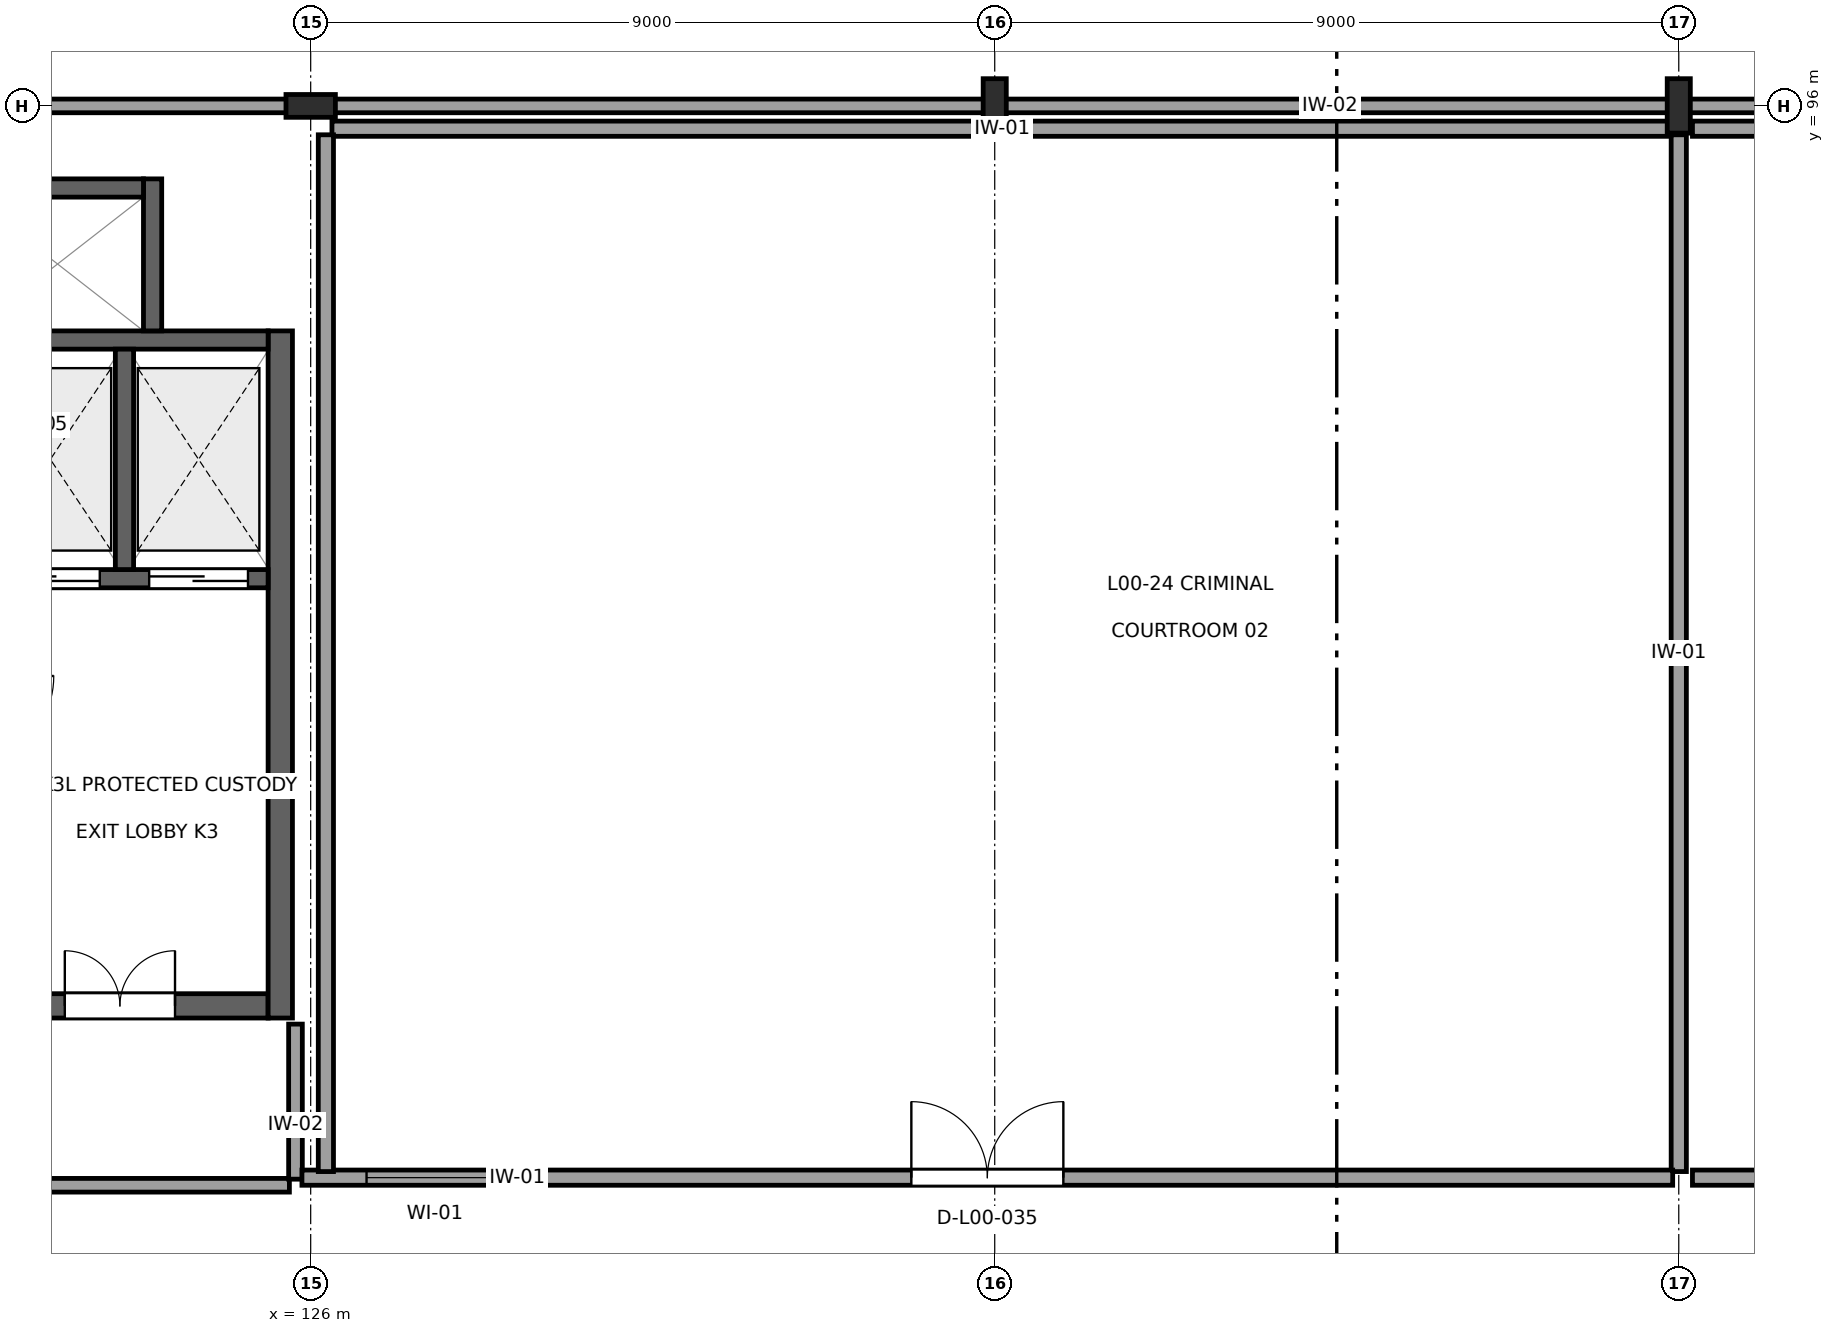
"""IFC4 building model, lengths in metres.
Left out: names, types, materials, properties, quantities, classifications, styles, units other than length and angle.
Written with IfcOpenShell. Run it as: python <this file> out.ifc"""

import sys

from ifc_helpers import new_model, si_unit, direction, frame, frame_2d, origin, origin_2d, place, context, subcontext, project, spatial, rectangle, i_section, extrude, element, fill, save


model = new_model("IFC4")
c1 = context("Model", 3, precision=1e-05, world=origin(), true_north=direction((0.0, 1.0)))
c2 = subcontext(c1, "Body", "Model", "MODEL_VIEW")
j1 = project(units=[si_unit("LENGTHUNIT", "METRE"), si_unit("PLANEANGLEUNIT", "RADIAN")], contexts=[c1])
p1 = place(None, origin())
s1 = spatial("IfcSite", under=j1, at=p1, CompositionType="ELEMENT")
p2 = place(p1, origin())
s2 = spatial("IfcBuilding", under=s1, at=p2, CompositionType="ELEMENT")
p3 = place(p2, origin())
s3 = spatial("IfcBuildingStorey", under=s2, at=p3, CompositionType="ELEMENT", Elevation=0.0)
p4 = place(p3, frame((126.0, 96.0, 0.0), z_axis=(0.0, 0.0, 1.0), x_axis=(0.0, 1.0, 0.0)))
e1 = element("IfcColumn", 1, at=p4, inside=s3, PredefinedType="COLUMN", context=c2, shape_type="SweptSolid", body=[
    extrude(i_section(OverallWidth=0.3, OverallDepth=0.65, WebThickness=0.016, FlangeThickness=0.031, at=origin_2d()), origin(), (0.0, 0.0, 1.0), 5.4),
])
for number, where, z_axis, x_axis in (
    (2, (135.0, 96.0, 0.0), (0.0, 0.0, 1.0), (1.0, 0.0, 0.0)),
    (3, (144.0, 96.0, 0.0), (0.0, 0.0, 1.0), (1.0, 0.0, 0.0)),
):
    element("IfcColumn", number, at=place(p3, frame(where, z_axis=z_axis, x_axis=x_axis)), inside=s3, PredefinedType="COLUMN", context=c2, shape_type="SweptSolid", body=[
        extrude(i_section(OverallWidth=0.304, OverallDepth=0.716, WebThickness=0.021, FlangeThickness=0.04, at=origin_2d()), origin(), (0.0, 0.0, 1.0), 5.4),
    ])
p5 = place(p3, frame((121.54, 84.16, 0.0), z_axis=(0.0, 0.0, 1.0), x_axis=(1.0, 0.0, 0.0)))
e4 = element("IfcWall", 4, at=p5, inside=s3, PredefinedType="SHEAR", context=c2, shape_type="SweptSolid", body=[
    extrude(rectangle(XDim=3.9, YDim=0.32, at=frame_2d((1.95, 0.0))), origin(), (0.0, 0.0, 1.0), 5.06),
])
p6 = place(p5, frame((1.225, 0.0, 0.0)))
e5 = element("IfcOpeningElement", 5, at=p6, cuts=e4, PredefinedType="OPENING", context=c2, shape_type="SweptSolid", body=[
    extrude(rectangle(XDim=1.45, YDim=2.2, at=frame_2d((0.725, 1.1))), frame((0.0, 0.175, 0.0), z_axis=(0.0, -1.0, 0.0), x_axis=(1.0, 0.0, 0.0)), (0.0, 0.0, 1.0), 0.35),
])
p7 = place(p3, frame((125.6, 84.0, 0.0), z_axis=(0.0, 0.0, 1.0), x_axis=(0.0, 1.0, 0.0)))
e6 = element("IfcWall", 6, at=p7, inside=s3, PredefinedType="SHEAR", context=c2, shape_type="SweptSolid", body=[
    extrude(rectangle(XDim=9.04, YDim=0.32, at=frame_2d((4.52, 0.0))), origin(), (0.0, 0.0, 1.0), 5.06),
])
p8 = place(p3, frame((121.54, 89.78, 0.0), z_axis=(0.0, 0.0, 1.0), x_axis=(1.0, 0.0, 0.0)))
e7 = element("IfcWall", 7, at=p8, inside=s3, PredefinedType="SHEAR", context=c2, shape_type="SweptSolid", body=[
    extrude(rectangle(XDim=3.9, YDim=0.24, at=frame_2d((1.95, 0.0))), origin(), (0.0, 0.0, 1.0), 5.21),
])
p9 = place(p8, frame((0.385, 0.0, 0.0)))
e8 = element("IfcOpeningElement", 8, at=p9, cuts=e7, PredefinedType="OPENING", context=c2, shape_type="SweptSolid", body=[
    extrude(rectangle(XDim=1.3, YDim=2.2, at=frame_2d((0.65, 1.1))), frame((0.0, 0.135, 0.0), z_axis=(0.0, -1.0, 0.0), x_axis=(1.0, 0.0, 0.0)), (0.0, 0.0, 1.0), 0.27),
])
p10 = place(p8, frame((2.335, 0.0, 0.0)))
e9 = element("IfcOpeningElement", 9, at=p10, cuts=e7, PredefinedType="OPENING", context=c2, shape_type="SweptSolid", body=[
    extrude(rectangle(XDim=1.3, YDim=2.2, at=frame_2d((0.65, 1.1))), frame((0.0, 0.135, 0.0), z_axis=(0.0, -1.0, 0.0), x_axis=(1.0, 0.0, 0.0)), (0.0, 0.0, 1.0), 0.27),
])
p11 = place(p3, frame((121.54, 92.92, 0.0), z_axis=(0.0, 0.0, 1.0), x_axis=(1.0, 0.0, 0.0)))
e10 = element("IfcWall", 10, at=p11, inside=s3, PredefinedType="SHEAR", context=c2, shape_type="SweptSolid", body=[
    extrude(rectangle(XDim=3.9, YDim=0.24, at=frame_2d((1.95, 0.0))), origin(), (0.0, 0.0, 1.0), 5.21),
])
p12 = place(p3, frame((123.55, 89.9, 0.0), z_axis=(0.0, 0.0, 1.0), x_axis=(0.0, 1.0, 0.0)))
e11 = element("IfcWall", 11, at=p12, inside=s3, PredefinedType="SHEAR", context=c2, shape_type="SweptSolid", body=[
    extrude(rectangle(XDim=2.9, YDim=0.24, at=frame_2d((1.45, 0.0))), origin(), (0.0, 0.0, 1.0), 5.21),
])
p13 = place(p3, frame((123.92, 93.04, 0.0), z_axis=(0.0, 0.0, 1.0), x_axis=(0.0, 1.0, 0.0)))
e12 = element("IfcWall", 12, at=p13, inside=s3, PredefinedType="SHEAR", context=c2, shape_type="SweptSolid", body=[
    extrude(rectangle(XDim=2.0, YDim=0.24, at=frame_2d((1.0, 0.0))), origin(), (0.0, 0.0, 1.0), 5.21),
])
p14 = place(p3, frame((121.54, 94.92, 0.0), z_axis=(0.0, 0.0, 1.0), x_axis=(1.0, 0.0, 0.0)))
e13 = element("IfcWall", 13, at=p14, inside=s3, PredefinedType="SHEAR", context=c2, shape_type="SweptSolid", body=[
    extrude(rectangle(XDim=2.26, YDim=0.24, at=frame_2d((1.13, 0.0))), origin(), (0.0, 0.0, 1.0), 5.21),
])
p15 = place(p3, frame((125.72, 81.8, 0.0), z_axis=(0.0, 0.0, 1.0), x_axis=(-1.0, 0.0, 0.0)))
e14 = element("IfcWall", 14, at=p15, inside=s3, PredefinedType="PARTITIONING", context=c2, shape_type="SweptSolid", body=[
    extrude(rectangle(XDim=12.44, YDim=0.18, at=frame_2d((6.22, 0.0))), origin(), (0.0, 0.0, 1.0), 5.04),
])
p16 = place(p15, frame((5.495, 0.0, 0.0)))
e15 = element("IfcOpeningElement", 15, at=p16, cuts=e14, PredefinedType="OPENING", context=c2, shape_type="SweptSolid", body=[
    extrude(rectangle(XDim=1.45, YDim=2.2, at=frame_2d((0.725, 1.1))), frame((0.0, 0.105, 0.0), z_axis=(0.0, -1.0, 0.0), x_axis=(1.0, 0.0, 0.0)), (0.0, 0.0, 1.0), 0.21),
])
p17 = place(p3, frame((125.8, 83.92, 0.0), z_axis=(0.0, 0.0, 1.0), x_axis=(0.0, -1.0, 0.0)))
e16 = element("IfcWall", 16, at=p17, inside=s3, PredefinedType="PARTITIONING", context=c2, shape_type="SweptSolid", body=[
    extrude(rectangle(XDim=2.04, YDim=0.18, at=frame_2d((1.02, 0.0))), origin(), (0.0, 0.0, 1.0), 4.445),
])
p18 = place(p3, frame((126.28, 95.7, 0.0), z_axis=(0.0, 0.0, 1.0), x_axis=(1.0, 0.0, 0.0)))
e17 = element("IfcWall", 17, at=p18, inside=s3, PredefinedType="PARTITIONING", context=c2, shape_type="SweptSolid", body=[
    extrude(rectangle(XDim=17.64, YDim=0.2, at=frame_2d((8.82, 0.0))), origin(), (0.0, 0.0, 1.0), 5.04),
])
p19 = place(p3, frame((144.0, 95.62, 0.0), z_axis=(0.0, 0.0, 1.0), x_axis=(0.0, -1.0, 0.0)))
e18 = element("IfcWall", 18, at=p19, inside=s3, PredefinedType="PARTITIONING", context=c2, shape_type="SweptSolid", body=[
    extrude(rectangle(XDim=13.64, YDim=0.2, at=frame_2d((6.82, 0.0))), origin(), (0.0, 0.0, 1.0), 4.405),
])
p20 = place(p3, frame((143.92, 81.9, 0.0), z_axis=(0.0, 0.0, 1.0), x_axis=(-1.0, 0.0, 0.0)))
e19 = element("IfcWall", 19, at=p20, inside=s3, PredefinedType="PARTITIONING", context=c2, shape_type="SweptSolid", body=[
    extrude(rectangle(XDim=18.035, YDim=0.2, at=frame_2d((9.018, 0.0))), origin(), (0.0, 0.0, 1.0), 5.04),
])
p21 = place(p20, frame((8.017, 0.0, 0.0)))
e20 = element("IfcOpeningElement", 20, at=p21, cuts=e19, PredefinedType="OPENING", context=c2, shape_type="SweptSolid", body=[
    extrude(rectangle(XDim=2.0, YDim=2.6, at=frame_2d((1.0, 1.3))), frame((0.0, 0.115, 0.0), z_axis=(0.0, -1.0, 0.0), x_axis=(1.0, 0.0, 0.0)), (0.0, 0.0, 1.0), 0.23),
])
p22 = place(p20, frame((15.385, 0.0, 1.05)))
e21 = element("IfcOpeningElement", 21, at=p22, cuts=e19, PredefinedType="OPENING", context=c2, shape_type="SweptSolid", body=[
    extrude(rectangle(XDim=1.8, YDim=1.1, at=frame_2d((0.9, 0.55))), frame((0.0, 0.115, 0.0), z_axis=(0.0, -1.0, 0.0), x_axis=(1.0, 0.0, 0.0)), (0.0, 0.0, 1.0), 0.23),
])
p23 = place(p3, frame((126.2, 81.98, 0.0), z_axis=(0.0, 0.0, 1.0), x_axis=(0.0, 1.0, 0.0)))
e22 = element("IfcWall", 22, at=p23, inside=s3, PredefinedType="PARTITIONING", context=c2, shape_type="SweptSolid", body=[
    extrude(rectangle(XDim=13.64, YDim=0.2, at=frame_2d((6.82, 0.0))), origin(), (0.0, 0.0, 1.0), 4.445),
])
p24 = place(p3, frame((153.365, 81.9, 0.0), z_axis=(0.0, 0.0, 1.0), x_axis=(-1.0, 0.0, 0.0)))
e23 = element("IfcWall", 23, at=p24, inside=s3, PredefinedType="PARTITIONING", context=c2, shape_type="SweptSolid", body=[
    extrude(rectangle(XDim=9.185, YDim=0.2, at=frame_2d((4.593, 0.0))), origin(), (0.0, 0.0, 1.0), 5.04),
])
p25 = place(p24, frame((3.643, 0.0, 0.0)))
e24 = element("IfcOpeningElement", 24, at=p25, cuts=e23, PredefinedType="OPENING", context=c2, shape_type="SweptSolid", body=[
    extrude(rectangle(XDim=1.9, YDim=2.5, at=frame_2d((0.95, 1.25))), frame((0.0, 0.115, 0.0), z_axis=(0.0, -1.0, 0.0), x_axis=(1.0, 0.0, 0.0)), (0.0, 0.0, 1.0), 0.23),
])
p26 = place(p24, frame((6.835, 0.0, 1.05)))
e25 = element("IfcOpeningElement", 25, at=p26, cuts=e23, PredefinedType="OPENING", context=c2, shape_type="SweptSolid", body=[
    extrude(rectangle(XDim=1.5, YDim=1.1, at=frame_2d((0.75, 0.55))), frame((0.0, 0.115, 0.0), z_axis=(0.0, -1.0, 0.0), x_axis=(1.0, 0.0, 0.0)), (0.0, 0.0, 1.0), 0.23),
])
p27 = place(p3, frame((144.18, 95.7, 0.0), z_axis=(0.0, 0.0, 1.0), x_axis=(1.0, 0.0, 0.0)))
e26 = element("IfcWall", 26, at=p27, inside=s3, PredefinedType="PARTITIONING", context=c2, shape_type="SweptSolid", body=[
    extrude(rectangle(XDim=8.94, YDim=0.2, at=frame_2d((4.47, 0.0))), origin(), (0.0, 0.0, 1.0), 5.04),
])
p28 = place(p3, frame((161.12, 96.0, 0.0), z_axis=(0.0, 0.0, 1.0), x_axis=(-1.0, 0.0, 0.0)))
e27 = element("IfcWall", 27, at=p28, inside=s3, PredefinedType="PARTITIONING", context=c2, shape_type="SweptSolid", body=[
    extrude(rectangle(XDim=35.04, YDim=0.18, at=frame_2d((17.52, 0.0))), origin(), (0.0, 0.0, 1.0), 4.545),
])
p29 = place(p28, frame((5.732, 0.0, 0.0)))
e28 = element("IfcOpeningElement", 28, at=p29, cuts=e27, PredefinedType="OPENING", context=c2, shape_type="SweptSolid", body=[
    extrude(rectangle(XDim=1.15, YDim=2.15, at=frame_2d((0.575, 1.075))), frame((0.0, 0.105, 0.0), z_axis=(0.0, -1.0, 0.0), x_axis=(1.0, 0.0, 0.0)), (0.0, 0.0, 1.0), 0.21),
])
p30 = place(p3, frame((125.92, 96.0, 0.0), z_axis=(0.0, 0.0, 1.0), x_axis=(-1.0, 0.0, 0.0)))
e29 = element("IfcWall", 29, at=p30, inside=s3, PredefinedType="PARTITIONING", context=c2, shape_type="SweptSolid", body=[
    extrude(rectangle(XDim=8.44, YDim=0.18, at=frame_2d((4.22, 0.0))), origin(), (0.0, 0.0, 1.0), 4.545),
])
p31 = place(p6, origin())
e30 = element("IfcDoor", 30, at=p31, inside=s3, OperationType="DOUBLE_DOOR_SINGLE_SWING", PredefinedType="DOOR", context=c2, shape_type="SweptSolid", body=[
    extrude(rectangle(XDim=1.45, YDim=2.2, at=frame_2d((0.725, 1.1))), frame((0.0, 0.025, 0.0), z_axis=(0.0, -1.0, 0.0), x_axis=(1.0, 0.0, 0.0)), (0.0, 0.0, 1.0), 0.05),
])
fill(e5, e30)
p32 = place(p9, origin())
e31 = element("IfcDoor", 31, at=p32, inside=s3, OperationType="DOUBLE_DOOR_SLIDING", PredefinedType="DOOR", context=c2, shape_type="SweptSolid", body=[
    extrude(rectangle(XDim=1.3, YDim=2.2, at=frame_2d((0.65, 1.1))), frame((0.0, 0.025, 0.0), z_axis=(0.0, -1.0, 0.0), x_axis=(1.0, 0.0, 0.0)), (0.0, 0.0, 1.0), 0.05),
])
fill(e8, e31)
p33 = place(p10, origin())
e32 = element("IfcDoor", 32, at=p33, inside=s3, OperationType="DOUBLE_DOOR_SLIDING", PredefinedType="DOOR", context=c2, shape_type="SweptSolid", body=[
    extrude(rectangle(XDim=1.3, YDim=2.2, at=frame_2d((0.65, 1.1))), frame((0.0, 0.025, 0.0), z_axis=(0.0, -1.0, 0.0), x_axis=(1.0, 0.0, 0.0)), (0.0, 0.0, 1.0), 0.05),
])
fill(e9, e32)
p34 = place(p21, frame((2.0, 0.0, 0.0), z_axis=(0.0, 0.0, 1.0), x_axis=(-1.0, 0.0, 0.0)))
e33 = element("IfcDoor", 33, at=p34, inside=s3, OperationType="DOUBLE_DOOR_SINGLE_SWING", PredefinedType="DOOR", context=c2, shape_type="SweptSolid", body=[
    extrude(rectangle(XDim=2.0, YDim=2.6, at=frame_2d((1.0, 1.3))), frame((0.0, 0.025, 0.0), z_axis=(0.0, -1.0, 0.0), x_axis=(1.0, 0.0, 0.0)), (0.0, 0.0, 1.0), 0.05),
])
fill(e20, e33)
p35 = place(p22, origin())
e34 = element("IfcWindow", 34, at=p35, inside=s3, PartitioningType="SINGLE_PANEL", PredefinedType="WINDOW", context=c2, shape_type="SweptSolid", body=[
    extrude(rectangle(XDim=1.8, YDim=1.1, at=frame_2d((0.9, 0.55))), frame((0.0, 0.03, 0.0), z_axis=(0.0, -1.0, 0.0), x_axis=(1.0, 0.0, 0.0)), (0.0, 0.0, 1.0), 0.06),
])
fill(e21, e34)
save(model, sys.argv[1])
